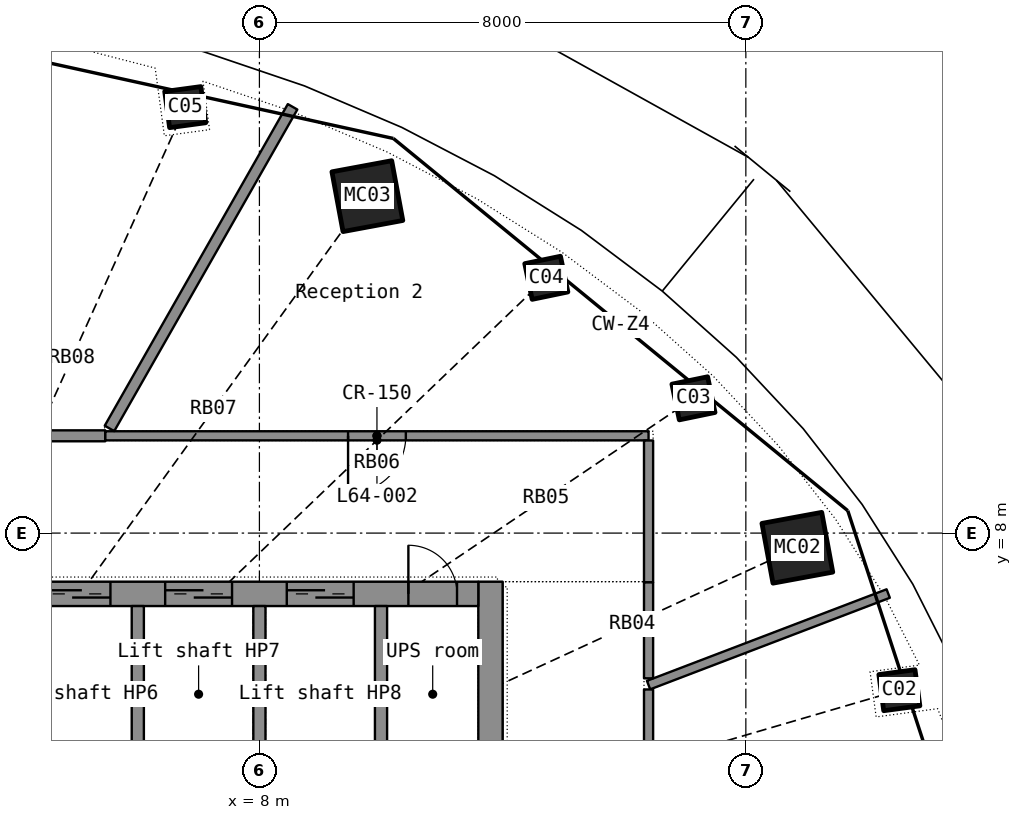
"""IFC4 building model, lengths in metres.
Left out: names, types, materials, properties, quantities, classifications, styles, units other than length and angle.
Written with IfcOpenShell. Run it as: python <this file> out.ifc"""

import sys

from ifc_helpers import new_model, si_unit, direction, frame, frame_2d, origin, origin_2d, place, context, subcontext, project, spatial, rectangle, hollow_rectangle, extrude, element, fill, save


model = new_model("IFC4")
c1 = context("Model", 3, precision=1e-05, world=origin(), true_north=direction((0.0, 1.0)))
c2 = subcontext(c1, "Body", "Model", "MODEL_VIEW")
j1 = project(units=[si_unit("LENGTHUNIT", "METRE"), si_unit("PLANEANGLEUNIT", "RADIAN")], contexts=[c1])
p1 = place(None, origin())
s1 = spatial("IfcSite", under=j1, at=p1, CompositionType="ELEMENT")
p2 = place(p1, origin())
s2 = spatial("IfcBuilding", under=s1, at=p2, CompositionType="ELEMENT")
p3 = place(p2, frame((0.0, 0.0, 261.5)))
s3 = spatial("IfcBuildingStorey", under=s2, at=p3, CompositionType="ELEMENT", Elevation=261.5)
p4 = place(p3, frame((18.525, 5.416, 0.0), z_axis=(-0.032511771, -0.009760126, 0.999423696), x_axis=(0.412568359, -0.910915403, 0.004525287)))
e1 = element("IfcColumn", 1, at=p4, inside=s3, PredefinedType="COLUMN", context=c2, shape_type="SweptSolid", body=[
    extrude(hollow_rectangle(XDim=0.6, YDim=0.6, WallThickness=0.025, at=origin_2d()), origin(), (0.0, 0.0, 1.0), 3.702),
])
p5 = place(p3, frame((16.847, 7.759, 0.0), z_axis=(-0.030006556, -0.014178922, 0.999449131), x_axis=(0.584046305, -0.811698022, 0.006019531)))
e2 = element("IfcColumn", 2, at=p5, inside=s3, PredefinedType="COLUMN", context=c2, shape_type="SweptSolid", body=[
    extrude(hollow_rectangle(XDim=1.0, YDim=1.0, WallThickness=0.032, at=origin_2d()), origin(), (0.0, 0.0, 1.0), 3.702),
])
p6 = place(p3, frame((15.139, 10.217, 0.0), z_axis=(-0.026512147, -0.01826832, 0.999481553), x_axis=(0.722216829, -0.691636028, 0.006515868)))
e3 = element("IfcColumn", 3, at=p6, inside=s3, PredefinedType="COLUMN", context=c2, shape_type="SweptSolid", body=[
    extrude(hollow_rectangle(XDim=0.6, YDim=0.6, WallThickness=0.025, at=origin_2d()), origin(), (0.0, 0.0, 1.0), 3.702),
])
p7 = place(p3, frame((12.719, 12.199, 0.0), z_axis=(-0.022226156, -0.021698532, 0.999517469), x_axis=(0.829024149, -0.559177363, 0.00629573)))
e4 = element("IfcColumn", 4, at=p7, inside=s3, PredefinedType="COLUMN", context=c2, shape_type="SweptSolid", body=[
    extrude(hollow_rectangle(XDim=0.6, YDim=0.6, WallThickness=0.025, at=origin_2d()), origin(), (0.0, 0.0, 1.0), 3.702),
])
p8 = place(p3, frame((9.775, 13.542, 0.0), z_axis=(-0.017280237, -0.024535299, 0.999549605), x_axis=(0.90888282, -0.417015619, 0.005476575)))
e5 = element("IfcColumn", 5, at=p8, inside=s3, PredefinedType="COLUMN", context=c2, shape_type="SweptSolid", body=[
    extrude(hollow_rectangle(XDim=1.0, YDim=1.0, WallThickness=0.032, at=origin_2d()), origin(), (0.0, 0.0, 1.0), 3.702),
])
p9 = place(p3, frame((6.78, 15.006, 0.0), z_axis=(-0.011872213, -0.026646524, 0.999574416), x_axis=(0.959771748, -0.280754097, 0.003915161)))
e6 = element("IfcColumn", 6, at=p9, inside=s3, PredefinedType="COLUMN", context=c2, shape_type="SweptSolid", body=[
    extrude(hollow_rectangle(XDim=0.6, YDim=0.6, WallThickness=0.025, at=origin_2d()), origin(), (0.0, 0.0, 1.0), 3.701),
])
p10 = place(p3, frame((11.8, -7.2, 0.0), z_axis=(0.0, 0.0, 1.0), x_axis=(0.0, 1.0, 0.0)))
e7 = element("IfcWall", 7, at=p10, inside=s3, PredefinedType="SHEAR", context=c2, shape_type="SweptSolid", body=[
    extrude(rectangle(XDim=14.4, YDim=0.4, at=frame_2d((7.2, 0.0))), origin(), (0.0, 0.0, 1.0), 3.3),
])
p11 = place(p10, frame((6.5, 0.0, 0.0)))
e8 = element("IfcOpeningElement", 8, at=p11, cuts=e7, PredefinedType="OPENING", context=c2, shape_type="SweptSolid", body=[
    extrude(rectangle(XDim=1.4, YDim=2.2, at=frame_2d((0.7, 1.1))), frame((0.0, 0.21, 0.0), z_axis=(0.0, -1.0, 0.0), x_axis=(1.0, 0.0, 0.0)), (0.0, 0.0, 1.0), 0.42),
])
p12 = place(p3, frame((-11.6, 7.0, 0.0), z_axis=(0.0, 0.0, 1.0), x_axis=(1.0, 0.0, 0.0)))
e9 = element("IfcWall", 9, at=p12, inside=s3, PredefinedType="SHEAR", context=c2, shape_type="SweptSolid", body=[
    extrude(rectangle(XDim=23.2, YDim=0.4, at=frame_2d((11.6, 0.0))), origin(), (0.0, 0.0, 1.0), 3.3),
])
p13 = place(p12, frame((2.05, 0.0, 0.0)))
e10 = element("IfcOpeningElement", 10, at=p13, cuts=e9, PredefinedType="OPENING", context=c2, shape_type="SweptSolid", body=[
    extrude(rectangle(XDim=1.1, YDim=2.2, at=frame_2d((0.55, 1.1))), frame((0.0, 0.21, 0.0), z_axis=(0.0, -1.0, 0.0), x_axis=(1.0, 0.0, 0.0)), (0.0, 0.0, 1.0), 0.42),
])
p14 = place(p12, frame((6.05, 0.0, 0.0)))
e11 = element("IfcOpeningElement", 11, at=p14, cuts=e9, PredefinedType="OPENING", context=c2, shape_type="SweptSolid", body=[
    extrude(rectangle(XDim=1.1, YDim=2.2, at=frame_2d((0.55, 1.1))), frame((0.0, 0.21, 0.0), z_axis=(0.0, -1.0, 0.0), x_axis=(1.0, 0.0, 0.0)), (0.0, 0.0, 1.0), 0.42),
])
p15 = place(p12, frame((8.05, 0.0, 0.0)))
e12 = element("IfcOpeningElement", 12, at=p15, cuts=e9, PredefinedType="OPENING", context=c2, shape_type="SweptSolid", body=[
    extrude(rectangle(XDim=1.1, YDim=2.2, at=frame_2d((0.55, 1.1))), frame((0.0, 0.21, 0.0), z_axis=(0.0, -1.0, 0.0), x_axis=(1.0, 0.0, 0.0)), (0.0, 0.0, 1.0), 0.42),
])
p16 = place(p12, frame((10.05, 0.0, 0.0)))
e13 = element("IfcOpeningElement", 13, at=p16, cuts=e9, PredefinedType="OPENING", context=c2, shape_type="SweptSolid", body=[
    extrude(rectangle(XDim=1.1, YDim=2.2, at=frame_2d((0.55, 1.1))), frame((0.0, 0.21, 0.0), z_axis=(0.0, -1.0, 0.0), x_axis=(1.0, 0.0, 0.0)), (0.0, 0.0, 1.0), 0.42),
])
p17 = place(p12, frame((12.05, 0.0, 0.0)))
e14 = element("IfcOpeningElement", 14, at=p17, cuts=e9, PredefinedType="OPENING", context=c2, shape_type="SweptSolid", body=[
    extrude(rectangle(XDim=1.1, YDim=2.2, at=frame_2d((0.55, 1.1))), frame((0.0, 0.21, 0.0), z_axis=(0.0, -1.0, 0.0), x_axis=(1.0, 0.0, 0.0)), (0.0, 0.0, 1.0), 0.42),
])
p18 = place(p12, frame((14.05, 0.0, 0.0)))
e15 = element("IfcOpeningElement", 15, at=p18, cuts=e9, PredefinedType="OPENING", context=c2, shape_type="SweptSolid", body=[
    extrude(rectangle(XDim=1.1, YDim=2.2, at=frame_2d((0.55, 1.1))), frame((0.0, 0.21, 0.0), z_axis=(0.0, -1.0, 0.0), x_axis=(1.0, 0.0, 0.0)), (0.0, 0.0, 1.0), 0.42),
])
p19 = place(p12, frame((16.05, 0.0, 0.0)))
e16 = element("IfcOpeningElement", 16, at=p19, cuts=e9, PredefinedType="OPENING", context=c2, shape_type="SweptSolid", body=[
    extrude(rectangle(XDim=1.1, YDim=2.2, at=frame_2d((0.55, 1.1))), frame((0.0, 0.21, 0.0), z_axis=(0.0, -1.0, 0.0), x_axis=(1.0, 0.0, 0.0)), (0.0, 0.0, 1.0), 0.42),
])
p20 = place(p12, frame((18.05, 0.0, 0.0)))
e17 = element("IfcOpeningElement", 17, at=p20, cuts=e9, PredefinedType="OPENING", context=c2, shape_type="SweptSolid", body=[
    extrude(rectangle(XDim=1.1, YDim=2.2, at=frame_2d((0.55, 1.1))), frame((0.0, 0.21, 0.0), z_axis=(0.0, -1.0, 0.0), x_axis=(1.0, 0.0, 0.0)), (0.0, 0.0, 1.0), 0.42),
])
p21 = place(p12, frame((20.05, 0.0, 0.0)))
e18 = element("IfcOpeningElement", 18, at=p21, cuts=e9, PredefinedType="OPENING", context=c2, shape_type="SweptSolid", body=[
    extrude(rectangle(XDim=1.1, YDim=2.2, at=frame_2d((0.55, 1.1))), frame((0.0, 0.21, 0.0), z_axis=(0.0, -1.0, 0.0), x_axis=(1.0, 0.0, 0.0)), (0.0, 0.0, 1.0), 0.42),
])
p22 = place(p12, frame((4.15, 0.0, 0.0)))
e19 = element("IfcOpeningElement", 19, at=p22, cuts=e9, PredefinedType="OPENING", context=c2, shape_type="SweptSolid", body=[
    extrude(rectangle(XDim=0.9, YDim=2.1, at=frame_2d((0.45, 1.05))), frame((0.0, 0.21, 0.0), z_axis=(0.0, -1.0, 0.0), x_axis=(1.0, 0.0, 0.0)), (0.0, 0.0, 1.0), 0.42),
])
p23 = place(p12, frame((0.35, 0.0, 0.0)))
e20 = element("IfcOpeningElement", 20, at=p23, cuts=e9, PredefinedType="OPENING", context=c2, shape_type="SweptSolid", body=[
    extrude(rectangle(XDim=0.8, YDim=2.05, at=frame_2d((0.4, 1.025))), frame((0.0, 0.21, 0.0), z_axis=(0.0, -1.0, 0.0), x_axis=(1.0, 0.0, 0.0)), (0.0, 0.0, 1.0), 0.42),
])
p24 = place(p12, frame((22.05, 0.0, 0.0)))
e21 = element("IfcOpeningElement", 21, at=p24, cuts=e9, PredefinedType="OPENING", context=c2, shape_type="SweptSolid", body=[
    extrude(rectangle(XDim=0.8, YDim=2.05, at=frame_2d((0.4, 1.025))), frame((0.0, 0.21, 0.0), z_axis=(0.0, -1.0, 0.0), x_axis=(1.0, 0.0, 0.0)), (0.0, 0.0, 1.0), 0.42),
])
for number, where, z_axis, x_axis in (
    (22, (6.0, 3.9, 0.0), (0.0, 0.0, 1.0), (0.0, 1.0, 0.0)),
    (23, (8.0, 3.9, 0.0), (0.0, 0.0, 1.0), (0.0, 1.0, 0.0)),
    (24, (10.0, 3.9, 0.0), (0.0, 0.0, 1.0), (0.0, 1.0, 0.0)),
):
    element("IfcWall", number, at=place(p3, frame(where, z_axis=z_axis, x_axis=x_axis)), inside=s3, PredefinedType="SHEAR", context=c2, shape_type="SweptSolid", body=[
        extrude(rectangle(XDim=2.9, YDim=0.2, at=frame_2d((1.45, 0.0))), origin(), (0.0, 0.0, 1.0), 3.3),
    ])
p25 = place(p3, frame((5.465, 9.6, 0.0), z_axis=(0.0, 0.0, 1.0), x_axis=(-1.0, 0.0, 0.0)))
e25 = element("IfcWall", 25, at=p25, inside=s3, PredefinedType="PARTITIONING", context=c2, shape_type="SweptSolid", body=[
    extrude(rectangle(XDim=10.93, YDim=0.18, at=frame_2d((5.465, 0.0))), origin(), (0.0, 0.0, 1.0), 2.4),
])
p26 = place(p25, frame((4.965, 0.0, 0.0)))
e26 = element("IfcOpeningElement", 26, at=p26, cuts=e25, PredefinedType="OPENING", context=c2, shape_type="SweptSolid", body=[
    extrude(rectangle(XDim=1.0, YDim=2.1, at=frame_2d((0.5, 1.05))), frame((0.0, 0.1, 0.0), z_axis=(0.0, -1.0, 0.0), x_axis=(1.0, 0.0, 0.0)), (0.0, 0.0, 1.0), 0.2),
])
p27 = place(p3, frame((14.4, 9.6, 0.0), z_axis=(0.0, 0.0, 1.0), x_axis=(-1.0, 0.0, 0.0)))
e27 = element("IfcWall", 27, at=p27, inside=s3, PredefinedType="PARTITIONING", context=c2, shape_type="SweptSolid", body=[
    extrude(rectangle(XDim=8.934, YDim=0.15, at=frame_2d((4.467, 0.0))), origin(), (0.0, 0.0, 1.0), 2.4),
])
p28 = place(p27, frame((3.992, 0.0, 0.0)))
e28 = element("IfcOpeningElement", 28, at=p28, cuts=e27, PredefinedType="OPENING", context=c2, shape_type="SweptSolid", body=[
    extrude(rectangle(XDim=0.95, YDim=2.15, at=frame_2d((0.475, 1.075))), frame((0.0, 0.085, 0.0), z_axis=(0.0, -1.0, 0.0), x_axis=(1.0, 0.0, 0.0)), (0.0, 0.0, 1.0), 0.17),
])
p29 = place(p3, frame((8.546, 15.011, 0.0), z_axis=(0.0, 0.0, 1.0), x_axis=(-0.494743126, -0.869039262, 0.0)))
e29 = element("IfcWall", 29, at=p29, inside=s3, PredefinedType="PARTITIONING", context=c2, shape_type="SweptSolid", body=[
    extrude(rectangle(XDim=6.087, YDim=0.18, at=frame_2d((3.043, 0.0))), origin(), (0.0, 0.0, 1.0), 2.4),
])
p30 = place(p3, frame((18.341, 7.006, 0.0), z_axis=(0.0, 0.0, 1.0), x_axis=(-0.934181218, -0.356798897, 0.0)))
e30 = element("IfcWall", 30, at=p30, inside=s3, PredefinedType="PARTITIONING", context=c2, shape_type="SweptSolid", body=[
    extrude(rectangle(XDim=4.219, YDim=0.15, at=frame_2d((2.109, 0.0))), origin(), (0.0, 0.0, 1.0), 2.4),
])
p31 = place(p3, frame((14.4, 1.65, 0.0), z_axis=(0.0, 0.0, 1.0), x_axis=(0.0, 1.0, 0.0)))
e31 = element("IfcWall", 31, at=p31, inside=s3, PredefinedType="PARTITIONING", context=c2, shape_type="SweptSolid", body=[
    extrude(rectangle(XDim=3.778, YDim=0.15, at=frame_2d((1.889, 0.0))), origin(), (0.0, 0.0, 1.0), 2.4),
])
p32 = place(p31, frame((1.414, 0.0, 0.0)))
e32 = element("IfcOpeningElement", 32, at=p32, cuts=e31, PredefinedType="OPENING", context=c2, shape_type="SweptSolid", body=[
    extrude(rectangle(XDim=0.95, YDim=2.15, at=frame_2d((0.475, 1.075))), frame((0.0, 0.085, 0.0), z_axis=(0.0, -1.0, 0.0), x_axis=(1.0, 0.0, 0.0)), (0.0, 0.0, 1.0), 0.17),
])
p33 = place(p3, frame((14.4, 7.19, 0.0), z_axis=(0.0, 0.0, 1.0), x_axis=(0.0, 1.0, 0.0)))
e33 = element("IfcWall", 33, at=p33, inside=s3, PredefinedType="PARTITIONING", context=c2, shape_type="SweptSolid", body=[
    extrude(rectangle(XDim=2.333, YDim=0.15, at=frame_2d((1.167, 0.0))), origin(), (0.0, 0.0, 1.0), 2.4),
])
p34 = place(p3, frame((14.4, 5.611, 0.0), z_axis=(0.0, 0.0, 1.0), x_axis=(0.0, 1.0, 0.0)))
e34 = element("IfcWall", 34, at=p34, inside=s3, PredefinedType="PARTITIONING", context=c2, shape_type="SweptSolid", body=[
    extrude(rectangle(XDim=1.578, YDim=0.15, at=frame_2d((0.789, 0.0))), origin(), (0.0, 0.0, 1.0), 2.4),
])
p35 = place(p19, origin())
e35 = element("IfcDoor", 35, at=p35, inside=s3, OperationType="DOUBLE_DOOR_SLIDING", PredefinedType="DOOR", context=c2, shape_type="SweptSolid", body=[
    extrude(rectangle(XDim=1.1, YDim=2.2, at=frame_2d((0.55, 1.1))), frame((0.0, 0.025, 0.0), z_axis=(0.0, -1.0, 0.0), x_axis=(1.0, 0.0, 0.0)), (0.0, 0.0, 1.0), 0.05),
])
fill(e16, e35)
p36 = place(p20, origin())
e36 = element("IfcDoor", 36, at=p36, inside=s3, OperationType="DOUBLE_DOOR_SLIDING", PredefinedType="DOOR", context=c2, shape_type="SweptSolid", body=[
    extrude(rectangle(XDim=1.1, YDim=2.2, at=frame_2d((0.55, 1.1))), frame((0.0, 0.025, 0.0), z_axis=(0.0, -1.0, 0.0), x_axis=(1.0, 0.0, 0.0)), (0.0, 0.0, 1.0), 0.05),
])
fill(e17, e36)
p37 = place(p21, origin())
e37 = element("IfcDoor", 37, at=p37, inside=s3, OperationType="DOUBLE_DOOR_SLIDING", PredefinedType="DOOR", context=c2, shape_type="SweptSolid", body=[
    extrude(rectangle(XDim=1.1, YDim=2.2, at=frame_2d((0.55, 1.1))), frame((0.0, 0.025, 0.0), z_axis=(0.0, -1.0, 0.0), x_axis=(1.0, 0.0, 0.0)), (0.0, 0.0, 1.0), 0.05),
])
fill(e18, e37)
p38 = place(p24, origin())
e38 = element("IfcDoor", 38, at=p38, inside=s3, OperationType="SINGLE_SWING_LEFT", PredefinedType="DOOR", context=c2, shape_type="SweptSolid", body=[
    extrude(rectangle(XDim=0.8, YDim=2.05, at=frame_2d((0.4, 1.025))), frame((0.0, 0.025, 0.0), z_axis=(0.0, -1.0, 0.0), x_axis=(1.0, 0.0, 0.0)), (0.0, 0.0, 1.0), 0.05),
])
fill(e21, e38)
p39 = place(p28, origin())
e39 = element("IfcDoor", 39, at=p39, inside=s3, OperationType="SINGLE_SWING_RIGHT", PredefinedType="DOOR", context=c2, shape_type="SweptSolid", body=[
    extrude(rectangle(XDim=0.95, YDim=2.15, at=frame_2d((0.475, 1.075))), frame((0.0, 0.025, 0.0), z_axis=(0.0, -1.0, 0.0), x_axis=(1.0, 0.0, 0.0)), (0.0, 0.0, 1.0), 0.05),
])
fill(e28, e39)
save(model, sys.argv[1])
